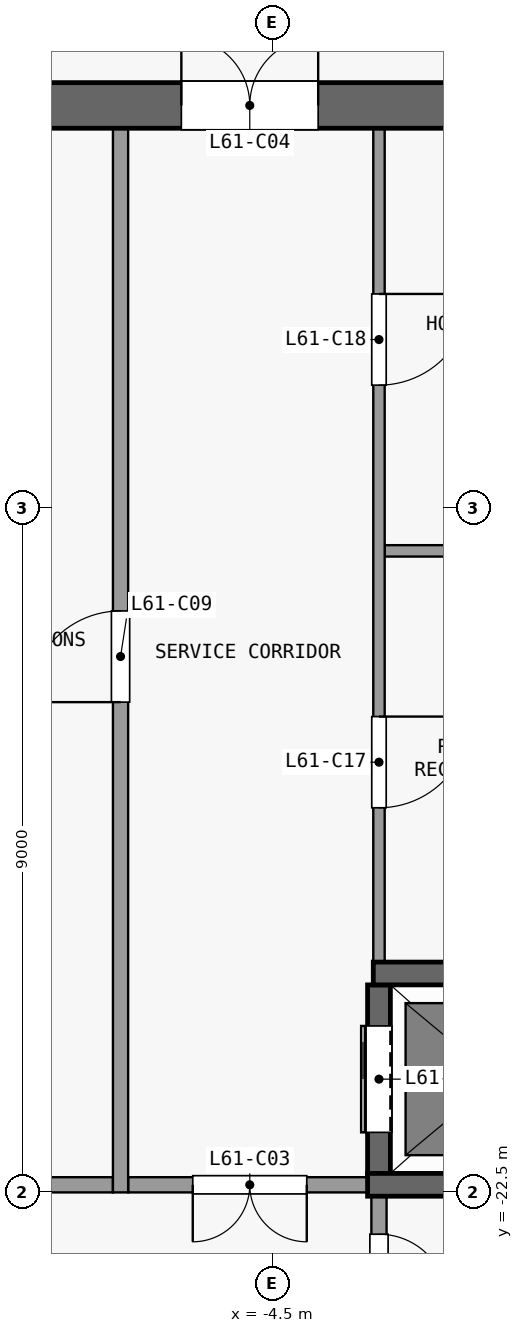
"""IFC4 building model, lengths in metres.
Left out: names, types, materials, properties, quantities, classifications, styles, units other than length and angle.
Written with IfcOpenShell. Run it as: python <this file> out.ifc"""

import sys

from ifc_helpers import new_model, si_unit, direction, frame, frame_2d, origin, place, context, subcontext, project, spatial, rectangle, extrude, element, fill, save


model = new_model("IFC4")
c1 = context("Model", 3, precision=1e-05, world=origin(), true_north=direction((0.0, 1.0)))
c2 = subcontext(c1, "Body", "Model", "MODEL_VIEW")
j1 = project(units=[si_unit("LENGTHUNIT", "METRE"), si_unit("PLANEANGLEUNIT", "RADIAN")], contexts=[c1])
p1 = place(None, origin())
s1 = spatial("IfcSite", under=j1, at=p1, CompositionType="ELEMENT")
p2 = place(p1, origin())
s2 = spatial("IfcBuilding", under=s1, at=p2, CompositionType="ELEMENT")
p3 = place(p2, frame((0.0, 0.0, 241.1)))
s3 = spatial("IfcBuildingStorey", under=s2, at=p3, CompositionType="ELEMENT", Elevation=241.1)
p4 = place(p3, frame((-13.2, -8.2, 0.0), z_axis=(0.0, 0.0, 1.0), x_axis=(1.0, 0.0, 0.0)))
e1 = element("IfcWall", 1, at=p4, inside=s3, PredefinedType="SHEAR", context=c2, shape_type="SweptSolid", body=[
    extrude(rectangle(XDim=26.4, YDim=0.6, at=frame_2d((13.2, 0.0))), origin(), (0.0, 0.0, 1.0), 3.3),
])
p5 = place(p4, frame((7.5, 0.0, 0.0)))
e2 = element("IfcOpeningElement", 2, at=p5, cuts=e1, PredefinedType="OPENING", context=c2, shape_type="SweptSolid", body=[
    extrude(rectangle(XDim=1.8, YDim=2.1, at=frame_2d((0.9, 1.05))), frame((0.0, 0.31, 0.0), z_axis=(0.0, -1.0, 0.0), x_axis=(1.0, 0.0, 0.0)), (0.0, 0.0, 1.0), 0.62),
])
p6 = place(p4, frame((17.1, 0.0, 0.0)))
e3 = element("IfcOpeningElement", 3, at=p6, cuts=e1, PredefinedType="OPENING", context=c2, shape_type="SweptSolid", body=[
    extrude(rectangle(XDim=1.8, YDim=2.1, at=frame_2d((0.9, 1.05))), frame((0.0, 0.31, 0.0), z_axis=(0.0, -1.0, 0.0), x_axis=(1.0, 0.0, 0.0)), (0.0, 0.0, 1.0), 0.62),
])
p7 = place(p4, frame((2.425, 0.0, 0.0)))
e4 = element("IfcOpeningElement", 4, at=p7, cuts=e1, PredefinedType="OPENING", context=c2, shape_type="SweptSolid", body=[
    extrude(rectangle(XDim=0.9, YDim=2.1, at=frame_2d((0.45, 1.05))), frame((0.0, 0.31, 0.0), z_axis=(0.0, -1.0, 0.0), x_axis=(1.0, 0.0, 0.0)), (0.0, 0.0, 1.0), 0.62),
])
p8 = place(p4, frame((23.075, 0.0, 0.0)))
e5 = element("IfcOpeningElement", 5, at=p8, cuts=e1, PredefinedType="OPENING", context=c2, shape_type="SweptSolid", body=[
    extrude(rectangle(XDim=0.9, YDim=2.1, at=frame_2d((0.45, 1.05))), frame((0.0, 0.31, 0.0), z_axis=(0.0, -1.0, 0.0), x_axis=(1.0, 0.0, 0.0)), (0.0, 0.0, 1.0), 0.62),
])
p9 = place(p3, frame((-9.45, -22.4, 0.0), z_axis=(0.0, 0.0, 1.0), x_axis=(1.0, 0.0, 0.0)))
e6 = element("IfcWall", 6, at=p9, inside=s3, PredefinedType="PARTITIONING", context=c2, shape_type="SweptSolid", body=[
    extrude(rectangle(XDim=2.85, YDim=0.2, at=frame_2d((1.425, 0.0))), origin(), (0.0, 0.0, 1.0), 3.3),
])
p10 = place(p3, frame((-3.25, -22.4, 0.0), z_axis=(0.0, 0.0, 1.0), x_axis=(-1.0, 0.0, 0.0)))
e7 = element("IfcWall", 7, at=p10, inside=s3, PredefinedType="PARTITIONING", context=c2, shape_type="SweptSolid", body=[
    extrude(rectangle(XDim=3.15, YDim=0.2, at=frame_2d((1.575, 0.0))), origin(), (0.0, 0.0, 1.0), 3.3),
])
p11 = place(p10, frame((0.8, 0.0, 0.0)))
e8 = element("IfcOpeningElement", 8, at=p11, cuts=e7, PredefinedType="OPENING", context=c2, shape_type="SweptSolid", body=[
    extrude(rectangle(XDim=1.5, YDim=2.1, at=frame_2d((0.75, 1.05))), frame((0.0, 0.11, 0.0), z_axis=(0.0, -1.0, 0.0), x_axis=(1.0, 0.0, 0.0)), (0.0, 0.0, 1.0), 0.22),
])
p12 = place(p3, frame((-3.25, -22.4, 0.0), z_axis=(0.0, 0.0, 1.0), x_axis=(1.0, 0.0, 0.0)))
e9 = element("IfcWall", 9, at=p12, inside=s3, PredefinedType="SHEAR", context=c2, shape_type="SweptSolid", body=[
    extrude(rectangle(XDim=6.5, YDim=0.3, at=frame_2d((3.25, 0.0))), origin(), (0.0, 0.0, 1.0), 3.3),
])
p13 = place(p3, frame((-3.175, -19.62, 0.0), z_axis=(0.0, 0.0, 1.0), x_axis=(1.0, 0.0, 0.0)))
e10 = element("IfcWall", 10, at=p13, inside=s3, PredefinedType="SHEAR", context=c2, shape_type="SweptSolid", body=[
    extrude(rectangle(XDim=3.025, YDim=0.3, at=frame_2d((1.513, 0.0))), origin(), (0.0, 0.0, 1.0), 3.3),
])
p14 = place(p3, frame((-3.025, -14.06, 0.0), z_axis=(0.0, 0.0, 1.0), x_axis=(1.0, 0.0, 0.0)))
e11 = element("IfcWall", 11, at=p14, inside=s3, PredefinedType="PARTITIONING", context=c2, shape_type="SweptSolid", body=[
    extrude(rectangle(XDim=2.925, YDim=0.15, at=frame_2d((1.462, 0.0))), origin(), (0.0, 0.0, 1.0), 3.3),
])
p15 = place(p3, frame((-6.5, -22.5, 0.0), z_axis=(0.0, 0.0, 1.0), x_axis=(0.0, 1.0, 0.0)))
e12 = element("IfcWall", 12, at=p15, inside=s3, PredefinedType="PARTITIONING", context=c2, shape_type="SweptSolid", body=[
    extrude(rectangle(XDim=14.0, YDim=0.2, at=frame_2d((7.0, 0.0))), origin(), (0.0, 0.0, 1.0), 3.3),
])
p16 = place(p15, frame((6.45, 0.0, 0.0)))
e13 = element("IfcOpeningElement", 13, at=p16, cuts=e12, PredefinedType="OPENING", context=c2, shape_type="SweptSolid", body=[
    extrude(rectangle(XDim=1.2, YDim=2.1, at=frame_2d((0.6, 1.05))), frame((0.0, 0.11, 0.0), z_axis=(0.0, -1.0, 0.0), x_axis=(1.0, 0.0, 0.0)), (0.0, 0.0, 1.0), 0.22),
])
p17 = place(p3, frame((-3.1, -22.55, 0.0), z_axis=(0.0, 0.0, 1.0), x_axis=(0.0, -1.0, 0.0)))
e14 = element("IfcWall", 14, at=p17, inside=s3, PredefinedType="PARTITIONING", context=c2, shape_type="SweptSolid", body=[
    extrude(rectangle(XDim=2.05, YDim=0.2, at=frame_2d((1.025, 0.0))), origin(), (0.0, 0.0, 1.0), 3.3),
])
p18 = place(p17, frame((0.5, 0.0, 0.0)))
e15 = element("IfcOpeningElement", 15, at=p18, cuts=e14, PredefinedType="OPENING", context=c2, shape_type="SweptSolid", body=[
    extrude(rectangle(XDim=0.9, YDim=2.1, at=frame_2d((0.45, 1.05))), frame((0.0, 0.11, 0.0), z_axis=(0.0, -1.0, 0.0), x_axis=(1.0, 0.0, 0.0)), (0.0, 0.0, 1.0), 0.22),
])
p19 = place(p3, frame((-3.1, -22.25, 0.0), z_axis=(0.0, 0.0, 1.0), x_axis=(0.0, 1.0, 0.0)))
e16 = element("IfcWall", 16, at=p19, inside=s3, PredefinedType="SHEAR", context=c2, shape_type="SweptSolid", body=[
    extrude(rectangle(XDim=2.48, YDim=0.3, at=frame_2d((1.24, 0.0))), origin(), (0.0, 0.0, 1.0), 3.3),
])
p20 = place(p19, frame((0.54, 0.0, 0.0)))
e17 = element("IfcOpeningElement", 17, at=p20, cuts=e16, PredefinedType="OPENING", context=c2, shape_type="SweptSolid", body=[
    extrude(rectangle(XDim=1.4, YDim=2.1, at=frame_2d((0.7, 1.05))), frame((0.0, 0.16, 0.0), z_axis=(0.0, -1.0, 0.0), x_axis=(1.0, 0.0, 0.0)), (0.0, 0.0, 1.0), 0.32),
])
p21 = place(p3, frame((-3.1, -8.5, 0.0), z_axis=(0.0, 0.0, 1.0), x_axis=(0.0, -1.0, 0.0)))
e18 = element("IfcWall", 18, at=p21, inside=s3, PredefinedType="PARTITIONING", context=c2, shape_type="SweptSolid", body=[
    extrude(rectangle(XDim=10.97, YDim=0.15, at=frame_2d((5.485, 0.0))), origin(), (0.0, 0.0, 1.0), 3.3),
])
p22 = place(p21, frame((7.74, 0.0, 0.0)))
e19 = element("IfcOpeningElement", 19, at=p22, cuts=e18, PredefinedType="OPENING", context=c2, shape_type="SweptSolid", body=[
    extrude(rectangle(XDim=1.2, YDim=2.1, at=frame_2d((0.6, 1.05))), frame((0.0, 0.085, 0.0), z_axis=(0.0, -1.0, 0.0), x_axis=(1.0, 0.0, 0.0)), (0.0, 0.0, 1.0), 0.17),
])
p23 = place(p21, frame((2.18, 0.0, 0.0)))
e20 = element("IfcOpeningElement", 20, at=p23, cuts=e18, PredefinedType="OPENING", context=c2, shape_type="SweptSolid", body=[
    extrude(rectangle(XDim=1.2, YDim=2.1, at=frame_2d((0.6, 1.05))), frame((0.0, 0.085, 0.0), z_axis=(0.0, -1.0, 0.0), x_axis=(1.0, 0.0, 0.0)), (0.0, 0.0, 1.0), 0.17),
])
p24 = place(p20, origin())
e21 = element("IfcDoor", 21, at=p24, inside=s3, OperationType="DOUBLE_DOOR_SLIDING", PredefinedType="DOOR", context=c2, shape_type="SweptSolid", body=[
    extrude(rectangle(XDim=1.4, YDim=2.1, at=frame_2d((0.7, 1.05))), frame((0.0, 0.025, 0.0), z_axis=(0.0, -1.0, 0.0), x_axis=(1.0, 0.0, 0.0)), (0.0, 0.0, 1.0), 0.05),
])
fill(e17, e21)
p25 = place(p11, origin())
e22 = element("IfcDoor", 22, at=p25, inside=s3, OperationType="DOUBLE_DOOR_SINGLE_SWING", PredefinedType="DOOR", context=c2, shape_type="SweptSolid", body=[
    extrude(rectangle(XDim=1.5, YDim=2.1, at=frame_2d((0.75, 1.05))), frame((0.0, 0.025, 0.0), z_axis=(0.0, -1.0, 0.0), x_axis=(1.0, 0.0, 0.0)), (0.0, 0.0, 1.0), 0.05),
])
fill(e8, e22)
p26 = place(p5, origin())
e23 = element("IfcDoor", 23, at=p26, inside=s3, OperationType="DOUBLE_DOOR_SINGLE_SWING", PredefinedType="DOOR", context=c2, shape_type="SweptSolid", body=[
    extrude(rectangle(XDim=1.8, YDim=2.1, at=frame_2d((0.9, 1.05))), frame((0.0, 0.025, 0.0), z_axis=(0.0, -1.0, 0.0), x_axis=(1.0, 0.0, 0.0)), (0.0, 0.0, 1.0), 0.05),
])
fill(e2, e23)
p27 = place(p16, origin())
e24 = element("IfcDoor", 24, at=p27, inside=s3, OperationType="SINGLE_SWING_LEFT", PredefinedType="DOOR", context=c2, shape_type="SweptSolid", body=[
    extrude(rectangle(XDim=1.2, YDim=2.1, at=frame_2d((0.6, 1.05))), frame((0.0, 0.025, 0.0), z_axis=(0.0, -1.0, 0.0), x_axis=(1.0, 0.0, 0.0)), (0.0, 0.0, 1.0), 0.05),
])
fill(e13, e24)
p28 = place(p18, origin())
e25 = element("IfcDoor", 25, at=p28, inside=s3, OperationType="SINGLE_SWING_RIGHT", PredefinedType="DOOR", context=c2, shape_type="SweptSolid", body=[
    extrude(rectangle(XDim=0.9, YDim=2.1, at=frame_2d((0.45, 1.05))), frame((0.0, 0.025, 0.0), z_axis=(0.0, -1.0, 0.0), x_axis=(1.0, 0.0, 0.0)), (0.0, 0.0, 1.0), 0.05),
])
fill(e15, e25)
p29 = place(p22, origin())
e26 = element("IfcDoor", 26, at=p29, inside=s3, OperationType="SINGLE_SWING_LEFT", PredefinedType="DOOR", context=c2, shape_type="SweptSolid", body=[
    extrude(rectangle(XDim=1.2, YDim=2.1, at=frame_2d((0.6, 1.05))), frame((0.0, 0.025, 0.0), z_axis=(0.0, -1.0, 0.0), x_axis=(1.0, 0.0, 0.0)), (0.0, 0.0, 1.0), 0.05),
])
fill(e19, e26)
p30 = place(p23, origin())
e27 = element("IfcDoor", 27, at=p30, inside=s3, OperationType="SINGLE_SWING_LEFT", PredefinedType="DOOR", context=c2, shape_type="SweptSolid", body=[
    extrude(rectangle(XDim=1.2, YDim=2.1, at=frame_2d((0.6, 1.05))), frame((0.0, 0.025, 0.0), z_axis=(0.0, -1.0, 0.0), x_axis=(1.0, 0.0, 0.0)), (0.0, 0.0, 1.0), 0.05),
])
fill(e20, e27)
save(model, sys.argv[1])
